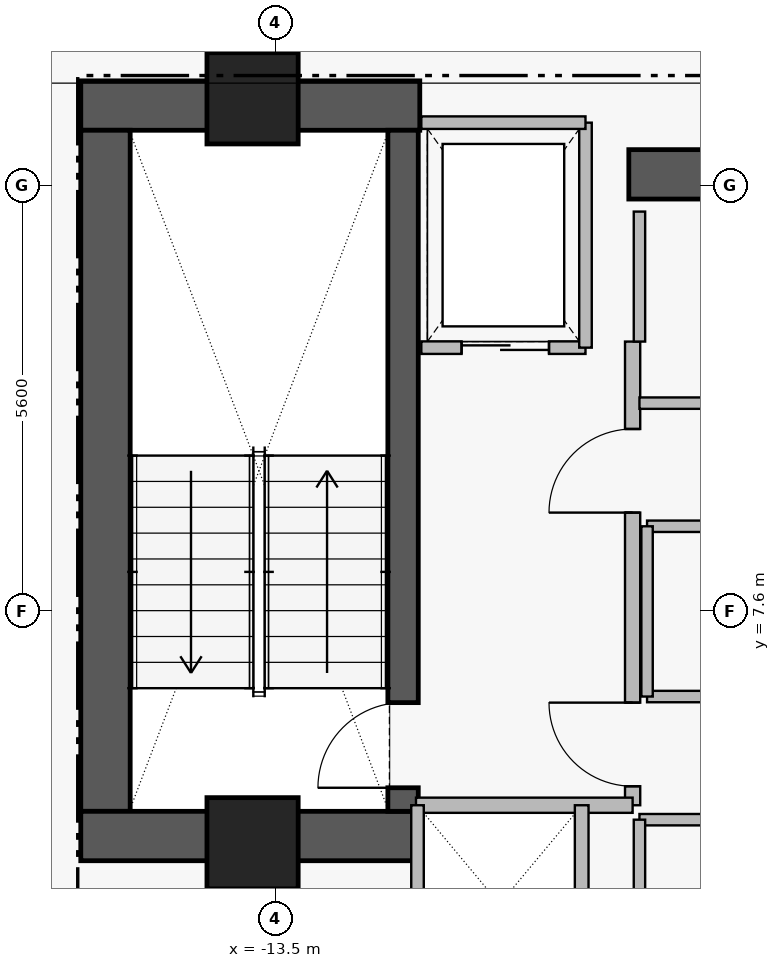
"""IFC4 building model, lengths in metres.
Left out: names, types, materials, properties, quantities, classifications, styles, units other than length and angle.
Written with IfcOpenShell. Run it as: python <this file> out.ifc"""

import sys

from ifc_helpers import new_model, si_unit, direction, frame, frame_2d, origin, origin_2d, place, context, subcontext, project, spatial, rectangle, extrude, element, fill, save


model = new_model("IFC4")
c1 = context("Model", 3, precision=1e-05, world=origin(), true_north=direction((0.0, 1.0)))
c2 = subcontext(c1, "Body", "Model", "MODEL_VIEW")
j1 = project(units=[si_unit("LENGTHUNIT", "METRE"), si_unit("PLANEANGLEUNIT", "RADIAN")], contexts=[c1])
p1 = place(None, origin())
s1 = spatial("IfcSite", under=j1, at=p1, CompositionType="ELEMENT")
p2 = place(p1, origin())
s2 = spatial("IfcBuilding", under=s1, at=p2, CompositionType="ELEMENT")
p3 = place(p2, frame((0.0, 0.0, 188.65)))
s3 = spatial("IfcBuildingStorey", under=s2, at=p3, CompositionType="ELEMENT", Elevation=188.65)
p4 = place(p3, frame((-16.06, 14.255, 0.0), z_axis=(0.0, 0.0, 1.0), x_axis=(1.0, 0.0, 0.0)))
e1 = element("IfcWall", 1, at=p4, inside=s3, PredefinedType="SHEAR", context=c2, shape_type="SweptSolid", body=[
    extrude(rectangle(XDim=4.46, YDim=0.65, at=frame_2d((2.23, 0.0))), origin(), (0.0, 0.0, 1.0), 3.56),
])
p5 = place(p3, frame((-15.735, 4.97, 0.0), z_axis=(0.0, 0.0, 1.0), x_axis=(0.0, 1.0, 0.0)))
e2 = element("IfcWall", 2, at=p5, inside=s3, PredefinedType="SHEAR", context=c2, shape_type="SweptSolid", body=[
    extrude(rectangle(XDim=8.96, YDim=0.65, at=frame_2d((4.48, 0.0))), origin(), (0.0, 0.0, 1.0), 3.56),
])
p6 = place(p3, frame((-16.06, 4.645, 0.0), z_axis=(0.0, 0.0, 1.0), x_axis=(1.0, 0.0, 0.0)))
e3 = element("IfcWall", 3, at=p6, inside=s3, PredefinedType="SHEAR", context=c2, shape_type="SweptSolid", body=[
    extrude(rectangle(XDim=4.46, YDim=0.65, at=frame_2d((2.23, 0.0))), origin(), (0.0, 0.0, 1.0), 3.56),
])
p7 = place(p3, frame((-8.85, 13.35, 0.0), z_axis=(0.0, 0.0, 1.0), x_axis=(1.0, 0.0, 0.0)))
e4 = element("IfcWall", 4, at=p7, inside=s3, PredefinedType="SHEAR", context=c2, shape_type="SweptSolid", body=[
    extrude(rectangle(XDim=7.6, YDim=0.65, at=frame_2d((3.8, 0.0))), origin(), (0.0, 0.0, 1.0), 3.53),
])
p8 = place(p3, frame((-11.82, 4.97, 0.0), z_axis=(0.0, 0.0, 1.0), x_axis=(0.0, 1.0, 0.0)))
e5 = element("IfcWall", 5, at=p8, inside=s3, PredefinedType="SHEAR", context=c2, shape_type="SweptSolid", body=[
    extrude(rectangle(XDim=8.96, YDim=0.4, at=frame_2d((4.48, 0.0))), origin(), (0.0, 0.0, 1.0), 3.56),
])
p9 = place(p8, frame((0.31, 0.0, 0.0)))
e6 = element("IfcOpeningElement", 6, at=p9, cuts=e5, PredefinedType="OPENING", context=c2, shape_type="SweptSolid", body=[
    extrude(rectangle(XDim=1.12, YDim=2.22, at=frame_2d((0.56, 1.11))), frame((0.0, 0.21, 0.0), z_axis=(0.0, -1.0, 0.0), x_axis=(1.0, 0.0, 0.0)), (0.0, 0.0, 1.0), 0.42),
])
for number, where, z_axis, x_axis in (
    (7, (-13.8, 14.35, 0.0), (0.0, 0.0, 1.0), (1.0, 0.0, 0.0)),
    (8, (-13.8, 4.55, 0.0), (0.0, 0.0, 1.0), (1.0, 0.0, 0.0)),
):
    element("IfcColumn", number, at=place(p3, frame(where, z_axis=z_axis, x_axis=x_axis)), inside=s3, PredefinedType="COLUMN", context=c2, shape_type="SweptSolid", body=[
        extrude(rectangle(XDim=1.2, YDim=1.2, at=origin_2d()), origin(), (0.0, 0.0, 1.0), 3.75),
    ])
p10 = place(p3, frame((-8.8, 5.05, 0.0), z_axis=(0.0, 0.0, 1.0), x_axis=(0.0, 1.0, 0.0)))
e9 = element("IfcWall", 9, at=p10, inside=s3, PredefinedType="PARTITIONING", context=c2, shape_type="SweptSolid", body=[
    extrude(rectangle(XDim=6.1, YDim=0.2, at=frame_2d((3.05, 0.0))), origin(), (0.0, 0.0, 1.0), 3.53),
])
p11 = place(p10, frame((0.25, 0.0, 0.0)))
e10 = element("IfcOpeningElement", 10, at=p11, cuts=e9, PredefinedType="OPENING", context=c2, shape_type="SweptSolid", body=[
    extrude(rectangle(XDim=1.1, YDim=2.2, at=frame_2d((0.55, 1.1))), frame((0.0, 0.11, 0.0), z_axis=(0.0, -1.0, 0.0), x_axis=(1.0, 0.0, 0.0)), (0.0, 0.0, 1.0), 0.22),
])
p12 = place(p10, frame((3.85, 0.0, 0.0)))
e11 = element("IfcOpeningElement", 11, at=p12, cuts=e9, PredefinedType="OPENING", context=c2, shape_type="SweptSolid", body=[
    extrude(rectangle(XDim=1.1, YDim=2.2, at=frame_2d((0.55, 1.1))), frame((0.0, 0.11, 0.0), z_axis=(0.0, -1.0, 0.0), x_axis=(1.0, 0.0, 0.0)), (0.0, 0.0, 1.0), 0.22),
])
p13 = place(p3, frame((-11.58, 11.07, 0.0), z_axis=(0.0, 0.0, 1.0), x_axis=(1.0, 0.0, 0.0)))
e12 = element("IfcWall", 12, at=p13, inside=s3, PredefinedType="PARTITIONING", context=c2, shape_type="SweptSolid", body=[
    extrude(rectangle(XDim=2.16, YDim=0.165, at=frame_2d((1.08, 0.0))), origin(), (0.0, 0.0, 1.0), 3.53),
])
p14 = place(p13, frame((0.53, 0.0, 0.0)))
e13 = element("IfcOpeningElement", 13, at=p14, cuts=e12, PredefinedType="OPENING", context=c2, shape_type="SweptSolid", body=[
    extrude(rectangle(XDim=1.15, YDim=2.25, at=frame_2d((0.575, 1.125))), frame((0.0, 0.093, 0.0), z_axis=(0.0, -1.0, 0.0), x_axis=(1.0, 0.0, 0.0)), (0.0, 0.0, 1.0), 0.185),
])
p15 = place(p3, frame((-8.71, 4.86, 0.0), z_axis=(0.0, 0.0, 1.0), x_axis=(1.0, 0.0, 0.0)))
e14 = element("IfcWall", 14, at=p15, inside=s3, PredefinedType="PARTITIONING", context=c2, shape_type="SweptSolid", body=[
    extrude(rectangle(XDim=4.52, YDim=0.15, at=frame_2d((2.26, 0.0))), origin(), (0.0, 0.0, 1.0), 3.53),
])
p16 = place(p15, frame((1.81, 0.0, 0.0)))
e15 = element("IfcOpeningElement", 15, at=p16, cuts=e14, PredefinedType="OPENING", context=c2, shape_type="SweptSolid", body=[
    extrude(rectangle(XDim=0.9, YDim=2.15, at=frame_2d((0.45, 1.075))), frame((0.0, 0.085, 0.0), z_axis=(0.0, -1.0, 0.0), x_axis=(1.0, 0.0, 0.0)), (0.0, 0.0, 1.0), 0.17),
])
p17 = place(p3, frame((-8.71, 10.34, 0.0), z_axis=(0.0, 0.0, 1.0), x_axis=(1.0, 0.0, 0.0)))
e16 = element("IfcWall", 16, at=p17, inside=s3, PredefinedType="PARTITIONING", context=c2, shape_type="SweptSolid", body=[
    extrude(rectangle(XDim=4.92, YDim=0.15, at=frame_2d((2.46, 0.0))), origin(), (0.0, 0.0, 1.0), 3.53),
])
p18 = place(p17, frame((2.01, 0.0, 0.0)))
e17 = element("IfcOpeningElement", 17, at=p18, cuts=e16, PredefinedType="OPENING", context=c2, shape_type="SweptSolid", body=[
    extrude(rectangle(XDim=0.9, YDim=2.15, at=frame_2d((0.45, 1.075))), frame((0.0, 0.085, 0.0), z_axis=(0.0, -1.0, 0.0), x_axis=(1.0, 0.0, 0.0)), (0.0, 0.0, 1.0), 0.17),
])
p19 = place(p3, frame((-8.61, 6.48, 0.0), z_axis=(0.0, 0.0, 1.0), x_axis=(1.0, 0.0, 0.0)))
e18 = element("IfcWall", 18, at=p19, inside=s3, PredefinedType="PARTITIONING", context=c2, shape_type="SweptSolid", body=[
    extrude(rectangle(XDim=3.62, YDim=0.15, at=frame_2d((1.81, 0.0))), origin(), (0.0, 0.0, 1.0), 3.53),
])
p20 = place(p19, frame((1.36, 0.0, 0.0)))
e19 = element("IfcOpeningElement", 19, at=p20, cuts=e18, PredefinedType="OPENING", context=c2, shape_type="SweptSolid", body=[
    extrude(rectangle(XDim=0.9, YDim=2.15, at=frame_2d((0.45, 1.075))), frame((0.0, 0.085, 0.0), z_axis=(0.0, -1.0, 0.0), x_axis=(1.0, 0.0, 0.0)), (0.0, 0.0, 1.0), 0.17),
])
p21 = place(p3, frame((-11.65, 5.05, 0.0), z_axis=(0.0, 0.0, 1.0), x_axis=(1.0, 0.0, 0.0)))
e20 = element("IfcWall", 20, at=p21, inside=s3, PredefinedType="PARTITIONING", context=c2, shape_type="SweptSolid", body=[
    extrude(rectangle(XDim=2.85, YDim=0.2, at=frame_2d((1.425, 0.0))), origin(), (0.0, 0.0, 1.0), 3.53),
])
p22 = place(p3, frame((-9.42, 11.07, 0.0), z_axis=(0.0, 0.0, 1.0), x_axis=(0.0, 1.0, 0.0)))
e21 = element("IfcWall", 21, at=p22, inside=s3, PredefinedType="PARTITIONING", context=c2, shape_type="SweptSolid", body=[
    extrude(rectangle(XDim=2.96, YDim=0.165, at=frame_2d((1.48, 0.0))), origin(), (0.0, 0.0, 1.0), 3.53),
])
p23 = place(p3, frame((-11.58, 14.03, 0.0), z_axis=(0.0, 0.0, 1.0), x_axis=(1.0, 0.0, 0.0)))
e22 = element("IfcWall", 22, at=p23, inside=s3, PredefinedType="PARTITIONING", context=c2, shape_type="SweptSolid", body=[
    extrude(rectangle(XDim=2.16, YDim=0.165, at=frame_2d((1.08, 0.0))), origin(), (0.0, 0.0, 1.0), 3.53),
])
p24 = place(p3, frame((-8.71, 2.49, 0.0), z_axis=(0.0, 0.0, 1.0), x_axis=(0.0, 1.0, 0.0)))
e23 = element("IfcWall", 23, at=p24, inside=s3, PredefinedType="PARTITIONING", context=c2, shape_type="SweptSolid", body=[
    extrude(rectangle(XDim=2.37, YDim=0.15, at=frame_2d((1.185, 0.0))), origin(), (0.0, 0.0, 1.0), 3.53),
])
p25 = place(p3, frame((-8.71, 11.15, 0.0), z_axis=(0.0, 0.0, 1.0), x_axis=(0.0, 1.0, 0.0)))
e24 = element("IfcWall", 24, at=p25, inside=s3, PredefinedType="PARTITIONING", context=c2, shape_type="SweptSolid", body=[
    extrude(rectangle(XDim=1.71, YDim=0.15, at=frame_2d((0.855, 0.0))), origin(), (0.0, 0.0, 1.0), 3.53),
])
p26 = place(p3, frame((-9.47, 2.45, 0.0), z_axis=(0.0, 0.0, 1.0), x_axis=(0.0, 1.0, 0.0)))
e25 = element("IfcWall", 25, at=p26, inside=s3, PredefinedType="PARTITIONING", context=c2, shape_type="SweptSolid", body=[
    extrude(rectangle(XDim=2.6, YDim=0.18, at=frame_2d((1.3, 0.0))), origin(), (0.0, 0.0, 1.0), 3.53),
])
p27 = place(p3, frame((-11.63, 2.47, 0.0), z_axis=(0.0, 0.0, 1.0), x_axis=(0.0, 1.0, 0.0)))
e26 = element("IfcWall", 26, at=p27, inside=s3, PredefinedType="PARTITIONING", context=c2, shape_type="SweptSolid", body=[
    extrude(rectangle(XDim=2.58, YDim=0.165, at=frame_2d((1.29, 0.0))), origin(), (0.0, 0.0, 1.0), 3.53),
])
p28 = place(p3, frame((-8.61, 8.72, 0.0), z_axis=(0.0, 0.0, 1.0), x_axis=(1.0, 0.0, 0.0)))
e27 = element("IfcWall", 27, at=p28, inside=s3, PredefinedType="PARTITIONING", context=c2, shape_type="SweptSolid", body=[
    extrude(rectangle(XDim=3.62, YDim=0.15, at=frame_2d((1.81, 0.0))), origin(), (0.0, 0.0, 1.0), 3.53),
])
p29 = place(p3, frame((-8.61, 6.48, 0.0), z_axis=(0.0, 0.0, 1.0), x_axis=(0.0, 1.0, 0.0)))
e28 = element("IfcWall", 28, at=p29, inside=s3, PredefinedType="PARTITIONING", context=c2, shape_type="SweptSolid", body=[
    extrude(rectangle(XDim=2.24, YDim=0.15, at=frame_2d((1.12, 0.0))), origin(), (0.0, 0.0, 1.0), 3.53),
])
p30 = place(p9, origin())
e29 = element("IfcDoor", 29, at=p30, inside=s3, OperationType="SINGLE_SWING_LEFT", PredefinedType="DOOR", context=c2, shape_type="SweptSolid", body=[
    extrude(rectangle(XDim=1.12, YDim=2.22, at=frame_2d((0.56, 1.11))), frame((0.0, 0.025, 0.0), z_axis=(0.0, -1.0, 0.0), x_axis=(1.0, 0.0, 0.0)), (0.0, 0.0, 1.0), 0.05),
])
fill(e6, e29)
p31 = place(p11, origin())
e30 = element("IfcDoor", 30, at=p31, inside=s3, OperationType="SINGLE_SWING_RIGHT", PredefinedType="DOOR", context=c2, shape_type="SweptSolid", body=[
    extrude(rectangle(XDim=1.1, YDim=2.2, at=frame_2d((0.55, 1.1))), frame((0.0, 0.025, 0.0), z_axis=(0.0, -1.0, 0.0), x_axis=(1.0, 0.0, 0.0)), (0.0, 0.0, 1.0), 0.05),
])
fill(e10, e30)
p32 = place(p12, origin())
e31 = element("IfcDoor", 31, at=p32, inside=s3, OperationType="SINGLE_SWING_LEFT", PredefinedType="DOOR", context=c2, shape_type="SweptSolid", body=[
    extrude(rectangle(XDim=1.1, YDim=2.2, at=frame_2d((0.55, 1.1))), frame((0.0, 0.025, 0.0), z_axis=(0.0, -1.0, 0.0), x_axis=(1.0, 0.0, 0.0)), (0.0, 0.0, 1.0), 0.05),
])
fill(e11, e31)
p33 = place(p14, origin())
e32 = element("IfcDoor", 32, at=p33, inside=s3, OperationType="SLIDING_TO_LEFT", PredefinedType="DOOR", context=c2, shape_type="SweptSolid", body=[
    extrude(rectangle(XDim=1.15, YDim=2.25, at=frame_2d((0.575, 1.125))), frame((0.0, 0.025, 0.0), z_axis=(0.0, -1.0, 0.0), x_axis=(1.0, 0.0, 0.0)), (0.0, 0.0, 1.0), 0.05),
])
fill(e13, e32)
save(model, sys.argv[1])
